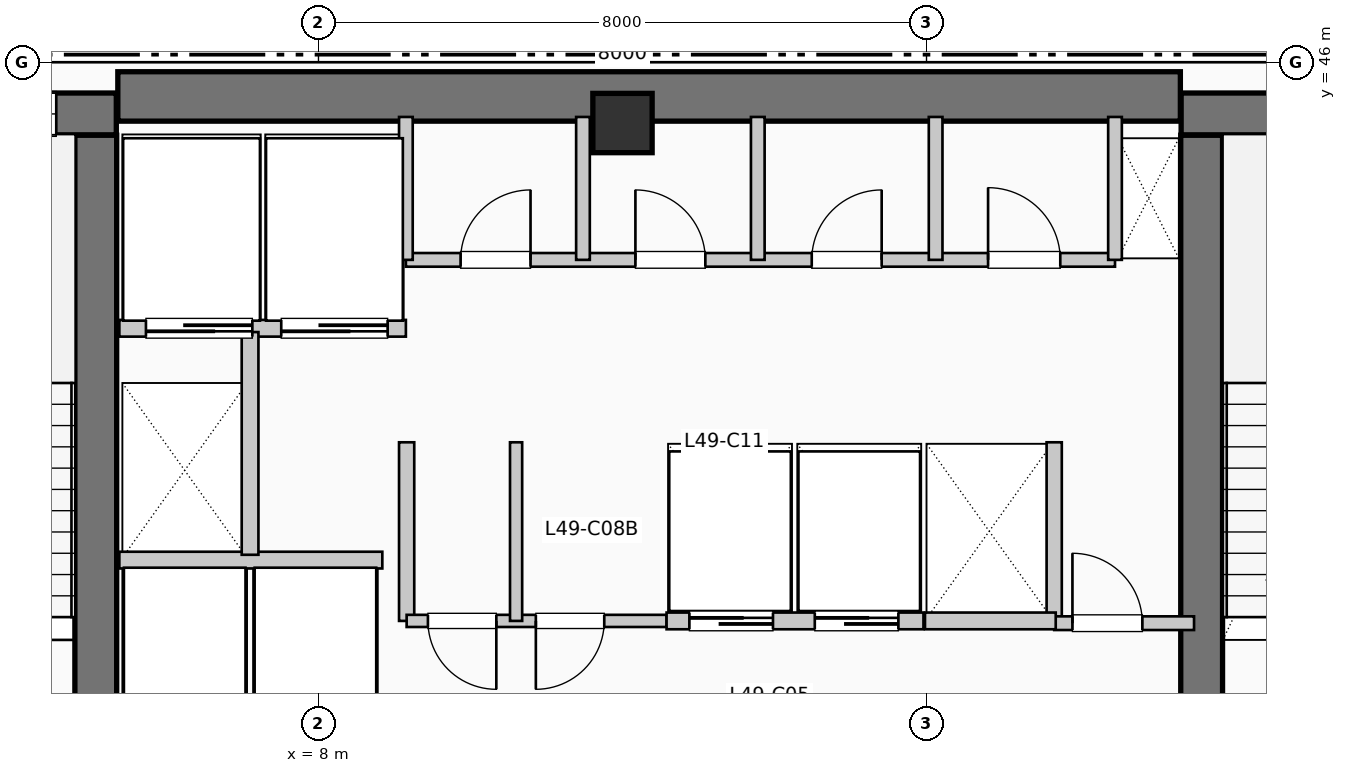
"""IFC4 building model, lengths in metres.
Left out: names, types, materials, properties, quantities, classifications, styles, units other than length and angle.
Written with IfcOpenShell. Run it as: python <this file> out.ifc"""

import sys

from ifc_helpers import new_model, si_unit, direction, frame, frame_2d, origin, origin_2d, place, context, subcontext, project, spatial, rectangle, extrude, element, fill, save


model = new_model("IFC4")
c1 = context("Model", 3, precision=1e-05, world=origin(), true_north=direction((0.0, 1.0)))
c2 = subcontext(c1, "Body", "Model", "MODEL_VIEW")
j1 = project(units=[si_unit("LENGTHUNIT", "METRE"), si_unit("PLANEANGLEUNIT", "RADIAN")], contexts=[c1])
p1 = place(None, origin())
s1 = spatial("IfcSite", under=j1, at=p1, CompositionType="ELEMENT")
p2 = place(p1, origin())
s2 = spatial("IfcBuilding", under=s1, at=p2, CompositionType="ELEMENT")
p3 = place(p2, frame((0.0, 0.0, 203.28)))
s3 = spatial("IfcBuildingStorey", under=s2, at=p3, CompositionType="ELEMENT", Elevation=203.28)
p4 = place(p3, frame((5.36, 45.55, 0.0), z_axis=(0.0, 0.0, 1.0), x_axis=(1.0, 0.0, 0.0)))
e1 = element("IfcWall", 1, at=p4, inside=s3, PredefinedType="SHEAR", context=c2, shape_type="SweptSolid", body=[
    extrude(rectangle(XDim=13.98, YDim=0.65, at=frame_2d((6.99, 0.0))), origin(), (0.0, 0.0, 1.0), 3.96),
])
p5 = place(p3, frame((5.07, 37.15, 0.0), z_axis=(0.0, 0.0, 1.0), x_axis=(0.0, 1.0, 0.0)))
e2 = element("IfcWall", 2, at=p5, inside=s3, PredefinedType="SHEAR", context=c2, shape_type="SweptSolid", body=[
    extrude(rectangle(XDim=7.89, YDim=0.55, at=frame_2d((3.945, 0.0))), origin(), (0.0, 0.0, 1.0), 3.96),
])
p6 = place(p3, frame((1.1, 45.32, 0.0), z_axis=(0.0, 0.0, 1.0), x_axis=(1.0, 0.0, 0.0)))
e3 = element("IfcWall", 3, at=p6, inside=s3, PredefinedType="SHEAR", context=c2, shape_type="SweptSolid", body=[
    extrude(rectangle(XDim=4.24, YDim=0.55, at=frame_2d((2.12, 0.0))), origin(), (0.0, 0.0, 1.0), 3.96),
])
p7 = place(p6, frame((2.05, 0.0, 1.05)))
e4 = element("IfcOpeningElement", 4, at=p7, cuts=e3, PredefinedType="OPENING", context=c2, shape_type="SweptSolid", body=[
    extrude(rectangle(XDim=1.4, YDim=1.8, at=frame_2d((0.7, 0.9))), frame((0.0, 0.285, 0.0), z_axis=(0.0, -1.0, 0.0), x_axis=(1.0, 0.0, 0.0)), (0.0, 0.0, 1.0), 0.57),
])
p8 = place(p3, frame((19.62, 37.15, 0.0), z_axis=(0.0, 0.0, 1.0), x_axis=(0.0, 1.0, 0.0)))
e5 = element("IfcWall", 5, at=p8, inside=s3, PredefinedType="SHEAR", context=c2, shape_type="SweptSolid", body=[
    extrude(rectangle(XDim=7.89, YDim=0.55, at=frame_2d((3.945, 0.0))), origin(), (0.0, 0.0, 1.0), 3.96),
])
p9 = place(p3, frame((19.35, 45.32, 0.0), z_axis=(0.0, 0.0, 1.0), x_axis=(1.0, 0.0, 0.0)))
e6 = element("IfcWall", 6, at=p9, inside=s3, PredefinedType="SHEAR", context=c2, shape_type="SweptSolid", body=[
    extrude(rectangle(XDim=3.69, YDim=0.55, at=frame_2d((1.845, 0.0))), origin(), (0.0, 0.0, 1.0), 3.96),
])
p10 = place(p9, frame((1.15, 0.0, 1.05)))
e7 = element("IfcOpeningElement", 7, at=p10, cuts=e6, PredefinedType="OPENING", context=c2, shape_type="SweptSolid", body=[
    extrude(rectangle(XDim=1.4, YDim=1.8, at=frame_2d((0.7, 0.9))), frame((0.0, 0.285, 0.0), z_axis=(0.0, -1.0, 0.0), x_axis=(1.0, 0.0, 0.0)), (0.0, 0.0, 1.0), 0.57),
])
p11 = place(p3, frame((12.0, 45.2, 0.0), z_axis=(0.0, 0.0, 1.0), x_axis=(1.0, 0.0, 0.0)))
e8 = element("IfcColumn", 8, at=p11, inside=s3, PredefinedType="COLUMN", context=c2, shape_type="SweptSolid", body=[
    extrude(rectangle(XDim=0.78, YDim=0.78, at=origin_2d()), origin(), (0.0, 0.0, 1.0), 3.96),
])
p12 = place(p3, frame((5.38, 39.45, 0.0), z_axis=(0.0, 0.0, 1.0), x_axis=(1.0, 0.0, 0.0)))
e9 = element("IfcWall", 9, at=p12, inside=s3, PredefinedType="PARTITIONING", context=c2, shape_type="SweptSolid", body=[
    extrude(rectangle(XDim=3.46, YDim=0.22, at=frame_2d((1.73, 0.0))), origin(), (0.0, 0.0, 1.0), 3.71),
])
p13 = place(p3, frame((5.38, 42.5, 0.0), z_axis=(0.0, 0.0, 1.0), x_axis=(1.0, 0.0, 0.0)))
e10 = element("IfcWall", 10, at=p13, inside=s3, PredefinedType="PARTITIONING", context=c2, shape_type="SweptSolid", body=[
    extrude(rectangle(XDim=3.77, YDim=0.22, at=frame_2d((1.885, 0.0))), origin(), (0.0, 0.0, 1.0), 3.71),
])
p14 = place(p13, frame((1.75, 0.0, 0.0), z_axis=(0.0, 0.0, 1.0), x_axis=(-1.0, 0.0, 0.0)))
e11 = element("IfcOpeningElement", 11, at=p14, cuts=e10, PredefinedType="OPENING", context=c2, shape_type="SweptSolid", body=[
    extrude(rectangle(XDim=1.4, YDim=2.2, at=frame_2d((0.7, 1.1))), frame((0.0, 0.12, 0.0), z_axis=(0.0, -1.0, 0.0), x_axis=(1.0, 0.0, 0.0)), (0.0, 0.0, 1.0), 0.24),
])
p15 = place(p13, frame((3.53, 0.0, 0.0), z_axis=(0.0, 0.0, 1.0), x_axis=(-1.0, 0.0, 0.0)))
e12 = element("IfcOpeningElement", 12, at=p15, cuts=e10, PredefinedType="OPENING", context=c2, shape_type="SweptSolid", body=[
    extrude(rectangle(XDim=1.4, YDim=2.2, at=frame_2d((0.7, 1.1))), frame((0.0, 0.12, 0.0), z_axis=(0.0, -1.0, 0.0), x_axis=(1.0, 0.0, 0.0)), (0.0, 0.0, 1.0), 0.24),
])
p16 = place(p3, frame((7.1, 39.52, 0.0), z_axis=(0.0, 0.0, 1.0), x_axis=(0.0, 1.0, 0.0)))
e13 = element("IfcWall", 13, at=p16, inside=s3, PredefinedType="PARTITIONING", context=c2, shape_type="SweptSolid", body=[
    extrude(rectangle(XDim=2.93, YDim=0.22, at=frame_2d((1.465, 0.0))), origin(), (0.0, 0.0, 1.0), 3.71),
])
for number, where, z_axis, x_axis in (
    (14, (9.16, 38.65, 0.0), (0.0, 0.0, 1.0), (0.0, 1.0, 0.0)),
    (15, (17.68, 38.65, 0.0), (0.0, 0.0, 1.0), (0.0, 1.0, 0.0)),
):
    element("IfcWall", number, at=place(p3, frame(where, z_axis=z_axis, x_axis=x_axis)), inside=s3, PredefinedType="PARTITIONING", context=c2, shape_type="SweptSolid", body=[
        extrude(rectangle(XDim=2.35, YDim=0.2, at=frame_2d((1.175, 0.0))), origin(), (0.0, 0.0, 1.0), 3.71),
    ])
p17 = place(p3, frame((17.68, 38.62, 0.0), z_axis=(0.0, 0.0, 1.0), x_axis=(1.0, 0.0, 0.0)))
e16 = element("IfcWall", 16, at=p17, inside=s3, PredefinedType="PARTITIONING", context=c2, shape_type="SweptSolid", body=[
    extrude(rectangle(XDim=1.84, YDim=0.18, at=frame_2d((0.92, 0.0))), origin(), (0.0, 0.0, 1.0), 3.71),
])
p18 = place(p17, frame((0.24, 0.0, 0.0)))
e17 = element("IfcOpeningElement", 17, at=p18, cuts=e16, PredefinedType="OPENING", context=c2, shape_type="SweptSolid", body=[
    extrude(rectangle(XDim=0.92, YDim=2.1, at=frame_2d((0.46, 1.05))), frame((0.0, 0.1, 0.0), z_axis=(0.0, -1.0, 0.0), x_axis=(1.0, 0.0, 0.0)), (0.0, 0.0, 1.0), 0.2),
])
p19 = place(p3, frame((9.16, 38.65, 0.0), z_axis=(0.0, 0.0, 1.0), x_axis=(1.0, 0.0, 0.0)))
e18 = element("IfcWall", 18, at=p19, inside=s3, PredefinedType="PARTITIONING", context=c2, shape_type="SweptSolid", body=[
    extrude(rectangle(XDim=3.42, YDim=0.16, at=frame_2d((1.71, 0.0))), origin(), (0.0, 0.0, 1.0), 3.71),
])
p20 = place(p19, frame((1.18, 0.0, 0.0), z_axis=(0.0, 0.0, 1.0), x_axis=(-1.0, 0.0, 0.0)))
e19 = element("IfcOpeningElement", 19, at=p20, cuts=e18, PredefinedType="OPENING", context=c2, shape_type="SweptSolid", body=[
    extrude(rectangle(XDim=0.9, YDim=2.15, at=frame_2d((0.45, 1.075))), frame((0.0, 0.09, 0.0), z_axis=(0.0, -1.0, 0.0), x_axis=(1.0, 0.0, 0.0)), (0.0, 0.0, 1.0), 0.18),
])
p21 = place(p19, frame((2.6, 0.0, 0.0), z_axis=(0.0, 0.0, 1.0), x_axis=(-1.0, 0.0, 0.0)))
e20 = element("IfcOpeningElement", 20, at=p21, cuts=e18, PredefinedType="OPENING", context=c2, shape_type="SweptSolid", body=[
    extrude(rectangle(XDim=0.9, YDim=2.15, at=frame_2d((0.45, 1.075))), frame((0.0, 0.09, 0.0), z_axis=(0.0, -1.0, 0.0), x_axis=(1.0, 0.0, 0.0)), (0.0, 0.0, 1.0), 0.18),
])
p22 = place(p3, frame((10.6, 38.65, 0.0), z_axis=(0.0, 0.0, 1.0), x_axis=(0.0, 1.0, 0.0)))
e21 = element("IfcWall", 21, at=p22, inside=s3, PredefinedType="PARTITIONING", context=c2, shape_type="SweptSolid", body=[
    extrude(rectangle(XDim=2.35, YDim=0.16, at=frame_2d((1.175, 0.0))), origin(), (0.0, 0.0, 1.0), 3.71),
])
p23 = place(p3, frame((12.58, 38.65, 0.0), z_axis=(0.0, 0.0, 1.0), x_axis=(1.0, 0.0, 0.0)))
e22 = element("IfcWall", 22, at=p23, inside=s3, PredefinedType="PARTITIONING", context=c2, shape_type="SweptSolid", body=[
    extrude(rectangle(XDim=3.38, YDim=0.22, at=frame_2d((1.69, 0.0))), origin(), (0.0, 0.0, 1.0), 3.71),
])
p24 = place(p23, frame((0.3, 0.0, 0.0)))
e23 = element("IfcOpeningElement", 23, at=p24, cuts=e22, PredefinedType="OPENING", context=c2, shape_type="SweptSolid", body=[
    extrude(rectangle(XDim=1.1, YDim=2.2, at=frame_2d((0.55, 1.1))), frame((0.0, 0.12, 0.0), z_axis=(0.0, -1.0, 0.0), x_axis=(1.0, 0.0, 0.0)), (0.0, 0.0, 1.0), 0.24),
])
p25 = place(p23, frame((1.95, 0.0, 0.0)))
e24 = element("IfcOpeningElement", 24, at=p25, cuts=e22, PredefinedType="OPENING", context=c2, shape_type="SweptSolid", body=[
    extrude(rectangle(XDim=1.1, YDim=2.2, at=frame_2d((0.55, 1.1))), frame((0.0, 0.12, 0.0), z_axis=(0.0, -1.0, 0.0), x_axis=(1.0, 0.0, 0.0)), (0.0, 0.0, 1.0), 0.24),
])
p26 = place(p3, frame((15.98, 38.65, 0.0), z_axis=(0.0, 0.0, 1.0), x_axis=(1.0, 0.0, 0.0)))
e25 = element("IfcWall", 25, at=p26, inside=s3, PredefinedType="PARTITIONING", context=c2, shape_type="SweptSolid", body=[
    extrude(rectangle(XDim=1.72, YDim=0.22, at=frame_2d((0.86, 0.0))), origin(), (0.0, 0.0, 1.0), 3.71),
])
p27 = place(p3, frame((9.15, 43.4, 0.0), z_axis=(0.0, 0.0, 1.0), x_axis=(1.0, 0.0, 0.0)))
e26 = element("IfcWall", 26, at=p27, inside=s3, PredefinedType="PLUMBINGWALL", context=c2, shape_type="SweptSolid", body=[
    extrude(rectangle(XDim=9.33, YDim=0.18, at=frame_2d((4.665, 0.0))), origin(), (0.0, 0.0, 1.0), 3.71),
])
p28 = place(p27, frame((0.72, 0.0, 0.0)))
e27 = element("IfcOpeningElement", 27, at=p28, cuts=e26, PredefinedType="OPENING", context=c2, shape_type="SweptSolid", body=[
    extrude(rectangle(XDim=0.92, YDim=2.1, at=frame_2d((0.46, 1.05))), frame((0.0, 0.1, 0.0), z_axis=(0.0, -1.0, 0.0), x_axis=(1.0, 0.0, 0.0)), (0.0, 0.0, 1.0), 0.2),
])
p29 = place(p27, frame((3.02, 0.0, 0.0)))
e28 = element("IfcOpeningElement", 28, at=p29, cuts=e26, PredefinedType="OPENING", context=c2, shape_type="SweptSolid", body=[
    extrude(rectangle(XDim=0.92, YDim=2.1, at=frame_2d((0.46, 1.05))), frame((0.0, 0.1, 0.0), z_axis=(0.0, -1.0, 0.0), x_axis=(1.0, 0.0, 0.0)), (0.0, 0.0, 1.0), 0.2),
])
p30 = place(p27, frame((5.34, 0.0, 0.0)))
e29 = element("IfcOpeningElement", 29, at=p30, cuts=e26, PredefinedType="OPENING", context=c2, shape_type="SweptSolid", body=[
    extrude(rectangle(XDim=0.92, YDim=2.1, at=frame_2d((0.46, 1.05))), frame((0.0, 0.1, 0.0), z_axis=(0.0, -1.0, 0.0), x_axis=(1.0, 0.0, 0.0)), (0.0, 0.0, 1.0), 0.2),
])
p31 = place(p27, frame((7.66, 0.0, 0.0)))
e30 = element("IfcOpeningElement", 30, at=p31, cuts=e26, PredefinedType="OPENING", context=c2, shape_type="SweptSolid", body=[
    extrude(rectangle(XDim=0.95, YDim=2.1, at=frame_2d((0.475, 1.05))), frame((0.0, 0.1, 0.0), z_axis=(0.0, -1.0, 0.0), x_axis=(1.0, 0.0, 0.0)), (0.0, 0.0, 1.0), 0.2),
])
for number, where, z_axis, x_axis in (
    (31, (9.15, 43.4, 0.0), (0.0, 0.0, 1.0), (0.0, 1.0, 0.0)),
    (32, (18.48, 43.4, 0.0), (0.0, 0.0, 1.0), (0.0, 1.0, 0.0)),
    (33, (11.48, 43.4, 0.0), (0.0, 0.0, 1.0), (0.0, 1.0, 0.0)),
    (34, (13.78, 43.4, 0.0), (0.0, 0.0, 1.0), (0.0, 1.0, 0.0)),
    (35, (16.12, 43.4, 0.0), (0.0, 0.0, 1.0), (0.0, 1.0, 0.0)),
):
    element("IfcWall", number, at=place(p3, frame(where, z_axis=z_axis, x_axis=x_axis)), inside=s3, PredefinedType="PLUMBINGWALL", context=c2, shape_type="SweptSolid", body=[
        extrude(rectangle(XDim=1.88, YDim=0.18, at=frame_2d((0.94, 0.0))), origin(), (0.0, 0.0, 1.0), 3.71),
    ])
p32 = place(p7, origin())
e36 = element("IfcWindow", 36, at=p32, inside=s3, PartitioningType="SINGLE_PANEL", PredefinedType="WINDOW", context=c2, shape_type="SweptSolid", body=[
    extrude(rectangle(XDim=1.4, YDim=1.8, at=frame_2d((0.7, 0.9))), frame((0.0, 0.03, 0.0), z_axis=(0.0, -1.0, 0.0), x_axis=(1.0, 0.0, 0.0)), (0.0, 0.0, 1.0), 0.06),
])
fill(e4, e36)
p33 = place(p14, origin())
e37 = element("IfcDoor", 37, at=p33, inside=s3, OperationType="SLIDING_TO_LEFT", PredefinedType="DOOR", context=c2, shape_type="SweptSolid", body=[
    extrude(rectangle(XDim=1.4, YDim=2.2, at=frame_2d((0.7, 1.1))), frame((0.0, 0.025, 0.0), z_axis=(0.0, -1.0, 0.0), x_axis=(1.0, 0.0, 0.0)), (0.0, 0.0, 1.0), 0.05),
])
fill(e11, e37)
p34 = place(p15, origin())
e38 = element("IfcDoor", 38, at=p34, inside=s3, OperationType="SLIDING_TO_LEFT", PredefinedType="DOOR", context=c2, shape_type="SweptSolid", body=[
    extrude(rectangle(XDim=1.4, YDim=2.2, at=frame_2d((0.7, 1.1))), frame((0.0, 0.025, 0.0), z_axis=(0.0, -1.0, 0.0), x_axis=(1.0, 0.0, 0.0)), (0.0, 0.0, 1.0), 0.05),
])
fill(e12, e38)
p35 = place(p18, origin())
e39 = element("IfcDoor", 39, at=p35, inside=s3, OperationType="SINGLE_SWING_LEFT", PredefinedType="DOOR", context=c2, shape_type="SweptSolid", body=[
    extrude(rectangle(XDim=0.92, YDim=2.1, at=frame_2d((0.46, 1.05))), frame((0.0, 0.025, 0.0), z_axis=(0.0, -1.0, 0.0), x_axis=(1.0, 0.0, 0.0)), (0.0, 0.0, 1.0), 0.05),
])
fill(e17, e39)
p36 = place(p20, origin())
e40 = element("IfcDoor", 40, at=p36, inside=s3, OperationType="SINGLE_SWING_RIGHT", PredefinedType="DOOR", context=c2, shape_type="SweptSolid", body=[
    extrude(rectangle(XDim=0.9, YDim=2.15, at=frame_2d((0.45, 1.075))), frame((0.0, 0.025, 0.0), z_axis=(0.0, -1.0, 0.0), x_axis=(1.0, 0.0, 0.0)), (0.0, 0.0, 1.0), 0.05),
])
fill(e19, e40)
p37 = place(p21, origin())
e41 = element("IfcDoor", 41, at=p37, inside=s3, OperationType="SINGLE_SWING_LEFT", PredefinedType="DOOR", context=c2, shape_type="SweptSolid", body=[
    extrude(rectangle(XDim=0.9, YDim=2.15, at=frame_2d((0.45, 1.075))), frame((0.0, 0.025, 0.0), z_axis=(0.0, -1.0, 0.0), x_axis=(1.0, 0.0, 0.0)), (0.0, 0.0, 1.0), 0.05),
])
fill(e20, e41)
p38 = place(p24, origin())
e42 = element("IfcDoor", 42, at=p38, inside=s3, OperationType="SLIDING_TO_RIGHT", PredefinedType="DOOR", context=c2, shape_type="SweptSolid", body=[
    extrude(rectangle(XDim=1.1, YDim=2.2, at=frame_2d((0.55, 1.1))), frame((0.0, 0.025, 0.0), z_axis=(0.0, -1.0, 0.0), x_axis=(1.0, 0.0, 0.0)), (0.0, 0.0, 1.0), 0.05),
])
fill(e23, e42)
p39 = place(p25, origin())
e43 = element("IfcDoor", 43, at=p39, inside=s3, OperationType="SLIDING_TO_RIGHT", PredefinedType="DOOR", context=c2, shape_type="SweptSolid", body=[
    extrude(rectangle(XDim=1.1, YDim=2.2, at=frame_2d((0.55, 1.1))), frame((0.0, 0.025, 0.0), z_axis=(0.0, -1.0, 0.0), x_axis=(1.0, 0.0, 0.0)), (0.0, 0.0, 1.0), 0.05),
])
fill(e24, e43)
p40 = place(p28, origin())
e44 = element("IfcDoor", 44, at=p40, inside=s3, OperationType="SINGLE_SWING_RIGHT", PredefinedType="DOOR", context=c2, shape_type="SweptSolid", body=[
    extrude(rectangle(XDim=0.92, YDim=2.1, at=frame_2d((0.46, 1.05))), frame((0.0, 0.025, 0.0), z_axis=(0.0, -1.0, 0.0), x_axis=(1.0, 0.0, 0.0)), (0.0, 0.0, 1.0), 0.05),
])
fill(e27, e44)
p41 = place(p29, origin())
e45 = element("IfcDoor", 45, at=p41, inside=s3, OperationType="SINGLE_SWING_LEFT", PredefinedType="DOOR", context=c2, shape_type="SweptSolid", body=[
    extrude(rectangle(XDim=0.92, YDim=2.1, at=frame_2d((0.46, 1.05))), frame((0.0, 0.025, 0.0), z_axis=(0.0, -1.0, 0.0), x_axis=(1.0, 0.0, 0.0)), (0.0, 0.0, 1.0), 0.05),
])
fill(e28, e45)
p42 = place(p30, origin())
e46 = element("IfcDoor", 46, at=p42, inside=s3, OperationType="SINGLE_SWING_RIGHT", PredefinedType="DOOR", context=c2, shape_type="SweptSolid", body=[
    extrude(rectangle(XDim=0.92, YDim=2.1, at=frame_2d((0.46, 1.05))), frame((0.0, 0.025, 0.0), z_axis=(0.0, -1.0, 0.0), x_axis=(1.0, 0.0, 0.0)), (0.0, 0.0, 1.0), 0.05),
])
fill(e29, e46)
p43 = place(p31, origin())
e47 = element("IfcDoor", 47, at=p43, inside=s3, OperationType="SINGLE_SWING_LEFT", PredefinedType="DOOR", context=c2, shape_type="SweptSolid", body=[
    extrude(rectangle(XDim=0.95, YDim=2.1, at=frame_2d((0.475, 1.05))), frame((0.0, 0.025, 0.0), z_axis=(0.0, -1.0, 0.0), x_axis=(1.0, 0.0, 0.0)), (0.0, 0.0, 1.0), 0.05),
])
fill(e30, e47)
save(model, sys.argv[1])
